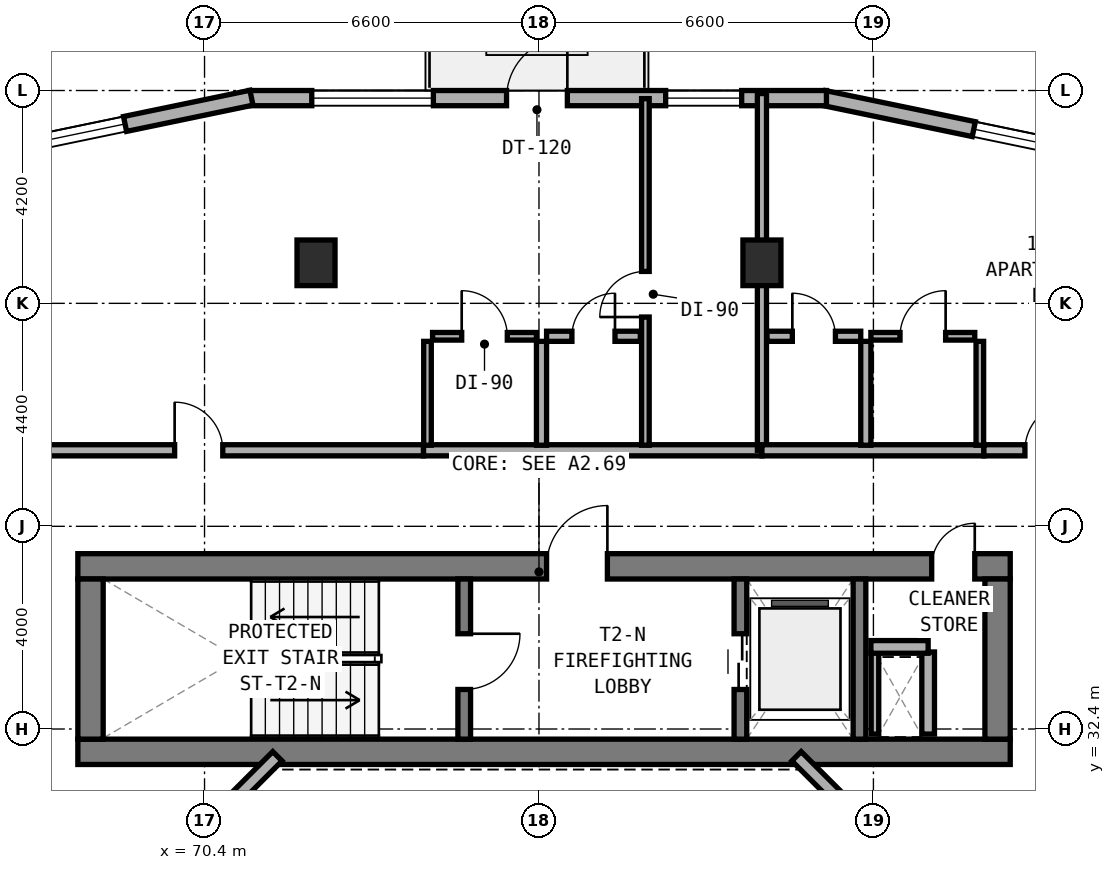
"""IFC4 building model, lengths in metres.
Left out: names, types, materials, properties, quantities, classifications, styles, units other than length and angle.
Written with IfcOpenShell. Run it as: python <this file> out.ifc"""

import sys

from ifc_helpers import new_model, si_unit, direction, frame, frame_2d, origin, origin_2d, place, context, subcontext, project, spatial, rectangle, extrude, element, fill, save


model = new_model("IFC4")
c1 = context("Model", 3, precision=1e-05, world=origin(), true_north=direction((0.0, 1.0)))
c2 = subcontext(c1, "Body", "Model", "MODEL_VIEW")
j1 = project(units=[si_unit("LENGTHUNIT", "METRE"), si_unit("PLANEANGLEUNIT", "RADIAN")], contexts=[c1])
p1 = place(None, origin())
s1 = spatial("IfcSite", under=j1, at=p1, CompositionType="ELEMENT")
p2 = place(p1, origin())
s2 = spatial("IfcBuilding", under=s1, at=p2, CompositionType="ELEMENT")
p3 = place(p2, frame((0.0, 0.0, 69.5)))
s3 = spatial("IfcBuildingStorey", under=s2, at=p3, CompositionType="ELEMENT", Elevation=69.5)
p4 = place(p3, frame((67.9, 31.95, 0.0), z_axis=(0.0, 0.0, 1.0), x_axis=(1.0, 0.0, 0.0)))
e1 = element("IfcWall", 1, at=p4, inside=s3, PredefinedType="SHEAR", context=c2, shape_type="SweptSolid", body=[
    extrude(rectangle(XDim=18.4, YDim=0.5, at=frame_2d((9.2, 0.0))), origin(), (0.0, 0.0, 1.0), 3.5),
])
p5 = place(p3, frame((67.9, 35.61, 0.0), z_axis=(0.0, 0.0, 1.0), x_axis=(1.0, 0.0, 0.0)))
e2 = element("IfcWall", 2, at=p5, inside=s3, PredefinedType="SHEAR", context=c2, shape_type="SweptSolid", body=[
    extrude(rectangle(XDim=18.4, YDim=0.5, at=frame_2d((9.2, 0.0))), origin(), (0.0, 0.0, 1.0), 3.5),
])
p6 = place(p5, frame((9.25, 0.0, 0.0)))
e3 = element("IfcOpeningElement", 3, at=p6, cuts=e2, PredefinedType="OPENING", context=c2, shape_type="SweptSolid", body=[
    extrude(rectangle(XDim=1.2, YDim=2.15, at=frame_2d((0.6, 1.075))), frame((0.0, 0.26, 0.0), z_axis=(0.0, -1.0, 0.0), x_axis=(1.0, 0.0, 0.0)), (0.0, 0.0, 1.0), 0.52),
])
p7 = place(p5, frame((16.85, 0.0, 0.0)))
e4 = element("IfcOpeningElement", 4, at=p7, cuts=e2, PredefinedType="OPENING", context=c2, shape_type="SweptSolid", body=[
    extrude(rectangle(XDim=0.85, YDim=2.1, at=frame_2d((0.425, 1.05))), frame((0.0, 0.26, 0.0), z_axis=(0.0, -1.0, 0.0), x_axis=(1.0, 0.0, 0.0)), (0.0, 0.0, 1.0), 0.52),
])
for number, where, z_axis, x_axis in (
    (5, (68.15, 32.2, 0.0), (0.0, 0.0, 1.0), (0.0, 1.0, 0.0)),
    (6, (86.05, 32.2, 0.0), (0.0, 0.0, 1.0), (0.0, 1.0, 0.0)),
):
    element("IfcWall", number, at=place(p3, frame(where, z_axis=z_axis, x_axis=x_axis)), inside=s3, PredefinedType="SHEAR", context=c2, shape_type="SweptSolid", body=[
        extrude(rectangle(XDim=3.16, YDim=0.5, at=frame_2d((1.58, 0.0))), origin(), (0.0, 0.0, 1.0), 3.5),
    ])
p8 = place(p3, frame((75.525, 32.2, 0.0), z_axis=(0.0, 0.0, 1.0), x_axis=(0.0, 1.0, 0.0)))
e7 = element("IfcWall", 7, at=p8, inside=s3, PredefinedType="STANDARD", context=c2, shape_type="SweptSolid", body=[
    extrude(rectangle(XDim=3.16, YDim=0.25, at=frame_2d((1.58, 0.0))), origin(), (0.0, 0.0, 1.0), 3.25),
])
p9 = place(p8, frame((0.98, 0.0, 0.0)))
e8 = element("IfcOpeningElement", 8, at=p9, cuts=e7, PredefinedType="OPENING", context=c2, shape_type="SweptSolid", body=[
    extrude(rectangle(XDim=1.1, YDim=2.15, at=frame_2d((0.55, 1.075))), frame((0.0, 0.135, 0.0), z_axis=(0.0, -1.0, 0.0), x_axis=(1.0, 0.0, 0.0)), (0.0, 0.0, 1.0), 0.27),
])
p10 = place(p3, frame((80.975, 32.2, 0.0), z_axis=(0.0, 0.0, 1.0), x_axis=(0.0, 1.0, 0.0)))
e9 = element("IfcWall", 9, at=p10, inside=s3, PredefinedType="STANDARD", context=c2, shape_type="SweptSolid", body=[
    extrude(rectangle(XDim=3.16, YDim=0.25, at=frame_2d((1.58, 0.0))), origin(), (0.0, 0.0, 1.0), 3.25),
])
p11 = place(p10, frame((0.98, 0.0, 0.0)))
e10 = element("IfcOpeningElement", 10, at=p11, cuts=e9, PredefinedType="OPENING", context=c2, shape_type="SweptSolid", body=[
    extrude(rectangle(XDim=1.1, YDim=2.15, at=frame_2d((0.55, 1.075))), frame((0.0, 0.135, 0.0), z_axis=(0.0, -1.0, 0.0), x_axis=(1.0, 0.0, 0.0)), (0.0, 0.0, 1.0), 0.27),
])
p12 = place(p3, frame((83.325, 32.2, 0.0), z_axis=(0.0, 0.0, 1.0), x_axis=(0.0, 1.0, 0.0)))
e11 = element("IfcWall", 11, at=p12, inside=s3, PredefinedType="STANDARD", context=c2, shape_type="SweptSolid", body=[
    extrude(rectangle(XDim=3.16, YDim=0.25, at=frame_2d((1.58, 0.0))), origin(), (0.0, 0.0, 1.0), 3.25),
])
for number, where, z_axis, x_axis in (
    (12, (72.6, 41.6, 0.0), (0.0, 0.0, 1.0), (1.0, 0.0, 0.0)),
    (13, (81.4, 41.6, 0.0), (0.0, 0.0, 1.0), (1.0, 0.0, 0.0)),
):
    element("IfcColumn", number, at=place(p3, frame(where, z_axis=z_axis, x_axis=x_axis)), inside=s3, PredefinedType="COLUMN", context=c2, shape_type="SweptSolid", body=[
        extrude(rectangle(XDim=0.75, YDim=0.9, at=origin_2d()), origin(), (0.0, 0.0, 1.0), 3.5),
    ])
p13 = place(p3, frame((91.298, 43.051, 0.0), z_axis=(0.0, 0.0, 1.0), x_axis=(-0.979120793441, 0.203279295189, 0.0)))
e14 = element("IfcWall", 14, at=p13, inside=s3, PredefinedType="STANDARD", context=c2, shape_type="SweptSolid", body=[
    extrude(rectangle(XDim=8.855, YDim=0.3, at=frame_2d((4.427, 0.0))), origin(), (0.0, 0.0, 1.0), 3.25),
])
p14 = place(p13, frame((3.439, 0.0, 0.8)))
e15 = element("IfcOpeningElement", 15, at=p14, cuts=e14, PredefinedType="OPENING", context=c2, shape_type="SweptSolid", body=[
    extrude(rectangle(XDim=2.4, YDim=1.6, at=frame_2d((1.2, 0.8))), frame((0.0, 0.16, 0.0), z_axis=(0.0, -1.0, 0.0), x_axis=(1.0, 0.0, 0.0)), (0.0, 0.0, 1.0), 0.32),
])
p15 = place(p3, frame((82.673, 44.85, 0.0), z_axis=(0.0, 0.0, 1.0), x_axis=(-1.0, 0.0, 0.0)))
e16 = element("IfcWall", 16, at=p15, inside=s3, PredefinedType="STANDARD", context=c2, shape_type="SweptSolid", body=[
    extrude(rectangle(XDim=11.391, YDim=0.3, at=frame_2d((5.696, 0.0))), origin(), (0.0, 0.0, 1.0), 3.25),
])
p16 = place(p15, frame((5.113, 0.0, 0.0)))
e17 = element("IfcOpeningElement", 17, at=p16, cuts=e16, PredefinedType="OPENING", context=c2, shape_type="SweptSolid", body=[
    extrude(rectangle(XDim=1.2, YDim=2.15, at=frame_2d((0.6, 1.075))), frame((0.0, 0.16, 0.0), z_axis=(0.0, -1.0, 0.0), x_axis=(1.0, 0.0, 0.0)), (0.0, 0.0, 1.0), 0.32),
])
p17 = place(p15, frame((1.673, 0.0, 0.85)))
e18 = element("IfcOpeningElement", 18, at=p17, cuts=e16, PredefinedType="OPENING", context=c2, shape_type="SweptSolid", body=[
    extrude(rectangle(XDim=1.5, YDim=1.5, at=frame_2d((0.75, 0.75))), frame((0.0, 0.16, 0.0), z_axis=(0.0, -1.0, 0.0), x_axis=(1.0, 0.0, 0.0)), (0.0, 0.0, 1.0), 0.32),
])
p18 = place(p15, frame((7.757, 0.0, 0.8)))
e19 = element("IfcOpeningElement", 19, at=p18, cuts=e16, PredefinedType="OPENING", context=c2, shape_type="SweptSolid", body=[
    extrude(rectangle(XDim=2.4, YDim=1.6, at=frame_2d((1.2, 0.8))), frame((0.0, 0.16, 0.0), z_axis=(0.0, -1.0, 0.0), x_axis=(1.0, 0.0, 0.0)), (0.0, 0.0, 1.0), 0.32),
])
p19 = place(p3, frame((71.326, 44.858, 0.0), z_axis=(0.0, 0.0, 1.0), x_axis=(-0.979124350489, -0.203262161453, 0.0)))
e20 = element("IfcWall", 20, at=p19, inside=s3, PredefinedType="STANDARD", context=c2, shape_type="SweptSolid", body=[
    extrude(rectangle(XDim=8.889, YDim=0.3, at=frame_2d((4.445, 0.0))), origin(), (0.0, 0.0, 1.0), 3.25),
])
p20 = place(p19, frame((2.548, 0.0, 0.8)))
e21 = element("IfcOpeningElement", 21, at=p20, cuts=e20, PredefinedType="OPENING", context=c2, shape_type="SweptSolid", body=[
    extrude(rectangle(XDim=2.4, YDim=1.6, at=frame_2d((1.2, 0.8))), frame((0.0, 0.16, 0.0), z_axis=(0.0, -1.0, 0.0), x_axis=(1.0, 0.0, 0.0)), (0.0, 0.0, 1.0), 0.32),
])
for number, where, z_axis, x_axis in (
    (22, (83.716, 30.228, 0.0), (0.0, 0.0, 1.0), (-0.707, 0.707, 0.0)),
    (23, (71.838, 31.862, 0.0), (0.0, 0.0, 1.0), (-0.707, -0.707, 0.0)),
):
    element("IfcWall", number, at=place(p3, frame(where, z_axis=z_axis, x_axis=x_axis)), inside=s3, PredefinedType="STANDARD", context=c2, shape_type="SweptSolid", body=[
        extrude(rectangle(XDim=2.311, YDim=0.26, at=frame_2d((1.155, 0.0))), origin(), (0.0, 0.0, 1.0), 3.25),
    ])
p21 = place(p3, frame((83.63, 32.3, 0.0), z_axis=(0.0, 0.0, 1.0), x_axis=(0.0, 1.0, 0.0)))
e24 = element("IfcWall", 24, at=p21, inside=s3, PredefinedType="PARTITIONING", context=c2, shape_type="SweptSolid", body=[
    extrude(rectangle(XDim=1.62, YDim=0.15, at=frame_2d((0.81, 0.0))), origin(), (0.0, 0.0, 1.0), 2.725),
])
p22 = place(p3, frame((84.68, 32.3, 0.0), z_axis=(0.0, 0.0, 1.0), x_axis=(0.0, 1.0, 0.0)))
e25 = element("IfcWall", 25, at=p22, inside=s3, PredefinedType="SOLIDWALL", context=c2, shape_type="SweptSolid", body=[
    extrude(rectangle(XDim=1.62, YDim=0.25, at=frame_2d((0.81, 0.0))), origin(), (0.0, 0.0, 1.0), 3.22),
])
p23 = place(p3, frame((83.55, 34.02, 0.0), z_axis=(0.0, 0.0, 1.0), x_axis=(1.0, 0.0, 0.0)))
e26 = element("IfcWall", 26, at=p23, inside=s3, PredefinedType="SOLIDWALL", context=c2, shape_type="SweptSolid", body=[
    extrude(rectangle(XDim=1.13, YDim=0.25, at=frame_2d((0.565, 0.0))), origin(), (0.0, 0.0, 1.0), 3.22),
])
p24 = place(p3, frame((74.72, 37.9, 0.0), z_axis=(0.0, 0.0, 1.0), x_axis=(1.0, 0.0, 0.0)))
e27 = element("IfcWall", 27, at=p24, inside=s3, PredefinedType="SOLIDWALL", context=c2, shape_type="SweptSolid", body=[
    extrude(rectangle(XDim=6.68, YDim=0.22, at=frame_2d((3.34, 0.0))), origin(), (0.0, 0.0, 1.0), 2.725),
])
p25 = place(p3, frame((65.85, 37.9, 0.0), z_axis=(0.0, 0.0, 1.0), x_axis=(1.0, 0.0, 0.0)))
e28 = element("IfcWall", 28, at=p25, inside=s3, PredefinedType="SOLIDWALL", context=c2, shape_type="SweptSolid", body=[
    extrude(rectangle(XDim=8.87, YDim=0.22, at=frame_2d((4.435, 0.0))), origin(), (0.0, 0.0, 1.0), 2.725),
])
p26 = place(p25, frame((3.96, 0.0, 0.0)))
e29 = element("IfcOpeningElement", 29, at=p26, cuts=e28, PredefinedType="OPENING", context=c2, shape_type="SweptSolid", body=[
    extrude(rectangle(XDim=0.95, YDim=2.1, at=frame_2d((0.475, 1.05))), frame((0.0, 0.12, 0.0), z_axis=(0.0, -1.0, 0.0), x_axis=(1.0, 0.0, 0.0)), (0.0, 0.0, 1.0), 0.24),
])
p27 = place(p3, frame((79.1, 38.0, 0.0), z_axis=(0.0, 0.0, 1.0), x_axis=(0.0, 1.0, 0.0)))
e30 = element("IfcWall", 30, at=p27, inside=s3, PredefinedType="PARTITIONING", context=c2, shape_type="SweptSolid", body=[
    extrude(rectangle(XDim=6.84, YDim=0.15, at=frame_2d((3.42, 0.0))), origin(), (0.0, 0.0, 1.0), 2.865),
])
p28 = place(p27, frame((2.53, 0.0, 0.0)))
e31 = element("IfcOpeningElement", 31, at=p28, cuts=e30, PredefinedType="OPENING", context=c2, shape_type="SweptSolid", body=[
    extrude(rectangle(XDim=0.9, YDim=2.1, at=frame_2d((0.45, 1.05))), frame((0.0, 0.085, 0.0), z_axis=(0.0, -1.0, 0.0), x_axis=(1.0, 0.0, 0.0)), (0.0, 0.0, 1.0), 0.17),
])
p29 = place(p3, frame((77.05, 38.0, 0.0), z_axis=(0.0, 0.0, 1.0), x_axis=(0.0, 1.0, 0.0)))
e32 = element("IfcWall", 32, at=p29, inside=s3, PredefinedType="PLUMBINGWALL", context=c2, shape_type="SweptSolid", body=[
    extrude(rectangle(XDim=2.05, YDim=0.2, at=frame_2d((1.025, 0.0))), origin(), (0.0, 0.0, 1.0), 2.955),
])
p30 = place(p3, frame((74.8, 38.0, 0.0), z_axis=(0.0, 0.0, 1.0), x_axis=(0.0, 1.0, 0.0)))
e33 = element("IfcWall", 33, at=p30, inside=s3, PredefinedType="PARTITIONING", context=c2, shape_type="SweptSolid", body=[
    extrude(rectangle(XDim=2.05, YDim=0.15, at=frame_2d((1.025, 0.0))), origin(), (0.0, 0.0, 1.0), 2.955),
])
p31 = place(p3, frame((77.15, 40.15, 0.0), z_axis=(0.0, 0.0, 1.0), x_axis=(1.0, 0.0, 0.0)))
e34 = element("IfcWall", 34, at=p31, inside=s3, PredefinedType="PLUMBINGWALL", context=c2, shape_type="SweptSolid", body=[
    extrude(rectangle(XDim=1.85, YDim=0.2, at=frame_2d((0.925, 0.0))), origin(), (0.0, 0.0, 1.0), 3.22),
])
p32 = place(p31, frame((0.5, 0.0, 0.0)))
e35 = element("IfcOpeningElement", 35, at=p32, cuts=e34, PredefinedType="OPENING", context=c2, shape_type="SweptSolid", body=[
    extrude(rectangle(XDim=0.85, YDim=2.1, at=frame_2d((0.425, 1.05))), frame((0.0, 0.11, 0.0), z_axis=(0.0, -1.0, 0.0), x_axis=(1.0, 0.0, 0.0)), (0.0, 0.0, 1.0), 0.22),
])
p33 = place(p3, frame((74.9, 40.15, 0.0), z_axis=(0.0, 0.0, 1.0), x_axis=(1.0, 0.0, 0.0)))
e36 = element("IfcWall", 36, at=p33, inside=s3, PredefinedType="PARTITIONING", context=c2, shape_type="SweptSolid", body=[
    extrude(rectangle(XDim=2.05, YDim=0.15, at=frame_2d((1.025, 0.0))), origin(), (0.0, 0.0, 1.0), 3.22),
])
p34 = place(p33, frame((0.575, 0.0, 0.0)))
e37 = element("IfcOpeningElement", 37, at=p34, cuts=e36, PredefinedType="OPENING", context=c2, shape_type="SweptSolid", body=[
    extrude(rectangle(XDim=0.9, YDim=2.1, at=frame_2d((0.45, 1.05))), frame((0.0, 0.085, 0.0), z_axis=(0.0, -1.0, 0.0), x_axis=(1.0, 0.0, 0.0)), (0.0, 0.0, 1.0), 0.17),
])
p35 = place(p3, frame((81.4, 37.9, 0.0), z_axis=(0.0, 0.0, 1.0), x_axis=(0.0, 1.0, 0.0)))
e38 = element("IfcWall", 38, at=p35, inside=s3, PredefinedType="SOLIDWALL", context=c2, shape_type="SweptSolid", body=[
    extrude(rectangle(XDim=7.04, YDim=0.18, at=frame_2d((3.52, 0.0))), origin(), (0.0, 0.0, 1.0), 2.725),
])
p36 = place(p3, frame((81.4, 37.9, 0.0), z_axis=(0.0, 0.0, 1.0), x_axis=(1.0, 0.0, 0.0)))
e39 = element("IfcWall", 39, at=p36, inside=s3, PredefinedType="SOLIDWALL", context=c2, shape_type="SweptSolid", body=[
    extrude(rectangle(XDim=4.38, YDim=0.22, at=frame_2d((2.19, 0.0))), origin(), (0.0, 0.0, 1.0), 2.725),
])
p37 = place(p3, frame((85.78, 37.9, 0.0), z_axis=(0.0, 0.0, 1.0), x_axis=(1.0, 0.0, 0.0)))
e40 = element("IfcWall", 40, at=p37, inside=s3, PredefinedType="SOLIDWALL", context=c2, shape_type="SweptSolid", body=[
    extrude(rectangle(XDim=2.57, YDim=0.22, at=frame_2d((1.285, 0.0))), origin(), (0.0, 0.0, 1.0), 3.22),
])
p38 = place(p37, frame((0.81, 0.0, 0.0)))
e41 = element("IfcOpeningElement", 41, at=p38, cuts=e40, PredefinedType="OPENING", context=c2, shape_type="SweptSolid", body=[
    extrude(rectangle(XDim=0.95, YDim=2.1, at=frame_2d((0.475, 1.05))), frame((0.0, 0.12, 0.0), z_axis=(0.0, -1.0, 0.0), x_axis=(1.0, 0.0, 0.0)), (0.0, 0.0, 1.0), 0.24),
])
p39 = place(p3, frame((83.45, 38.0, 0.0), z_axis=(0.0, 0.0, 1.0), x_axis=(0.0, 1.0, 0.0)))
e42 = element("IfcWall", 42, at=p39, inside=s3, PredefinedType="PLUMBINGWALL", context=c2, shape_type="SweptSolid", body=[
    extrude(rectangle(XDim=2.05, YDim=0.2, at=frame_2d((1.025, 0.0))), origin(), (0.0, 0.0, 1.0), 3.22),
])
p40 = place(p3, frame((85.7, 38.0, 0.0), z_axis=(0.0, 0.0, 1.0), x_axis=(0.0, 1.0, 0.0)))
e43 = element("IfcWall", 43, at=p40, inside=s3, PredefinedType="PARTITIONING", context=c2, shape_type="SweptSolid", body=[
    extrude(rectangle(XDim=2.05, YDim=0.15, at=frame_2d((1.025, 0.0))), origin(), (0.0, 0.0, 1.0), 3.22),
])
p41 = place(p3, frame((81.5, 40.15, 0.0), z_axis=(0.0, 0.0, 1.0), x_axis=(1.0, 0.0, 0.0)))
e44 = element("IfcWall", 44, at=p41, inside=s3, PredefinedType="PLUMBINGWALL", context=c2, shape_type="SweptSolid", body=[
    extrude(rectangle(XDim=1.85, YDim=0.2, at=frame_2d((0.925, 0.0))), origin(), (0.0, 0.0, 1.0), 2.725),
])
p42 = place(p41, frame((0.5, 0.0, 0.0)))
e45 = element("IfcOpeningElement", 45, at=p42, cuts=e44, PredefinedType="OPENING", context=c2, shape_type="SweptSolid", body=[
    extrude(rectangle(XDim=0.85, YDim=2.1, at=frame_2d((0.425, 1.05))), frame((0.0, 0.11, 0.0), z_axis=(0.0, -1.0, 0.0), x_axis=(1.0, 0.0, 0.0)), (0.0, 0.0, 1.0), 0.22),
])
p43 = place(p3, frame((83.55, 40.15, 0.0), z_axis=(0.0, 0.0, 1.0), x_axis=(1.0, 0.0, 0.0)))
e46 = element("IfcWall", 46, at=p43, inside=s3, PredefinedType="PARTITIONING", context=c2, shape_type="SweptSolid", body=[
    extrude(rectangle(XDim=2.05, YDim=0.15, at=frame_2d((1.025, 0.0))), origin(), (0.0, 0.0, 1.0), 3.22),
])
p44 = place(p43, frame((0.575, 0.0, 0.0)))
e47 = element("IfcOpeningElement", 47, at=p44, cuts=e46, PredefinedType="OPENING", context=c2, shape_type="SweptSolid", body=[
    extrude(rectangle(XDim=0.9, YDim=2.1, at=frame_2d((0.45, 1.05))), frame((0.0, 0.085, 0.0), z_axis=(0.0, -1.0, 0.0), x_axis=(1.0, 0.0, 0.0)), (0.0, 0.0, 1.0), 0.17),
])
p45 = place(p14, origin())
e48 = element("IfcWindow", 48, at=p45, inside=s3, PartitioningType="SINGLE_PANEL", PredefinedType="WINDOW", context=c2, shape_type="SweptSolid", body=[
    extrude(rectangle(XDim=2.4, YDim=1.6, at=frame_2d((1.2, 0.8))), frame((0.0, 0.03, 0.0), z_axis=(0.0, -1.0, 0.0), x_axis=(1.0, 0.0, 0.0)), (0.0, 0.0, 1.0), 0.06),
])
fill(e15, e48)
p46 = place(p16, frame((1.2, 0.0, 0.0), z_axis=(0.0, 0.0, 1.0), x_axis=(-1.0, 0.0, 0.0)))
e49 = element("IfcDoor", 49, at=p46, inside=s3, OperationType="SINGLE_SWING_RIGHT", PredefinedType="DOOR", context=c2, shape_type="SweptSolid", body=[
    extrude(rectangle(XDim=1.2, YDim=2.15, at=frame_2d((0.6, 1.075))), frame((0.0, 0.025, 0.0), z_axis=(0.0, -1.0, 0.0), x_axis=(1.0, 0.0, 0.0)), (0.0, 0.0, 1.0), 0.05),
])
fill(e17, e49)
p47 = place(p17, origin())
e50 = element("IfcWindow", 50, at=p47, inside=s3, PartitioningType="SINGLE_PANEL", PredefinedType="WINDOW", context=c2, shape_type="SweptSolid", body=[
    extrude(rectangle(XDim=1.5, YDim=1.5, at=frame_2d((0.75, 0.75))), frame((0.0, 0.03, 0.0), z_axis=(0.0, -1.0, 0.0), x_axis=(1.0, 0.0, 0.0)), (0.0, 0.0, 1.0), 0.06),
])
fill(e18, e50)
p48 = place(p18, origin())
e51 = element("IfcWindow", 51, at=p48, inside=s3, PartitioningType="SINGLE_PANEL", PredefinedType="WINDOW", context=c2, shape_type="SweptSolid", body=[
    extrude(rectangle(XDim=2.4, YDim=1.6, at=frame_2d((1.2, 0.8))), frame((0.0, 0.03, 0.0), z_axis=(0.0, -1.0, 0.0), x_axis=(1.0, 0.0, 0.0)), (0.0, 0.0, 1.0), 0.06),
])
fill(e19, e51)
p49 = place(p20, origin())
e52 = element("IfcWindow", 52, at=p49, inside=s3, PartitioningType="SINGLE_PANEL", PredefinedType="WINDOW", context=c2, shape_type="SweptSolid", body=[
    extrude(rectangle(XDim=2.4, YDim=1.6, at=frame_2d((1.2, 0.8))), frame((0.0, 0.03, 0.0), z_axis=(0.0, -1.0, 0.0), x_axis=(1.0, 0.0, 0.0)), (0.0, 0.0, 1.0), 0.06),
])
fill(e21, e52)
p50 = place(p9, frame((1.1, 0.0, 0.0), z_axis=(0.0, 0.0, 1.0), x_axis=(-1.0, 0.0, 0.0)))
e53 = element("IfcDoor", 53, at=p50, inside=s3, OperationType="SINGLE_SWING_LEFT", PredefinedType="DOOR", context=c2, shape_type="SweptSolid", body=[
    extrude(rectangle(XDim=1.1, YDim=2.15, at=frame_2d((0.55, 1.075))), frame((0.0, 0.025, 0.0), z_axis=(0.0, -1.0, 0.0), x_axis=(1.0, 0.0, 0.0)), (0.0, 0.0, 1.0), 0.05),
])
fill(e8, e53)
p51 = place(p6, origin())
e54 = element("IfcDoor", 54, at=p51, inside=s3, OperationType="SINGLE_SWING_RIGHT", PredefinedType="DOOR", context=c2, shape_type="SweptSolid", body=[
    extrude(rectangle(XDim=1.2, YDim=2.15, at=frame_2d((0.6, 1.075))), frame((0.0, 0.025, 0.0), z_axis=(0.0, -1.0, 0.0), x_axis=(1.0, 0.0, 0.0)), (0.0, 0.0, 1.0), 0.05),
])
fill(e3, e54)
p52 = place(p11, origin())
e55 = element("IfcDoor", 55, at=p52, inside=s3, OperationType="DOUBLE_DOOR_SLIDING", PredefinedType="DOOR", context=c2, shape_type="SweptSolid", body=[
    extrude(rectangle(XDim=1.1, YDim=2.15, at=frame_2d((0.55, 1.075))), frame((0.0, 0.025, 0.0), z_axis=(0.0, -1.0, 0.0), x_axis=(1.0, 0.0, 0.0)), (0.0, 0.0, 1.0), 0.05),
])
fill(e10, e55)
p53 = place(p7, origin())
e56 = element("IfcDoor", 56, at=p53, inside=s3, OperationType="SINGLE_SWING_RIGHT", PredefinedType="DOOR", context=c2, shape_type="SweptSolid", body=[
    extrude(rectangle(XDim=0.85, YDim=2.1, at=frame_2d((0.425, 1.05))), frame((0.0, 0.025, 0.0), z_axis=(0.0, -1.0, 0.0), x_axis=(1.0, 0.0, 0.0)), (0.0, 0.0, 1.0), 0.05),
])
fill(e4, e56)
p54 = place(p26, origin())
e57 = element("IfcDoor", 57, at=p54, inside=s3, OperationType="SINGLE_SWING_LEFT", PredefinedType="DOOR", context=c2, shape_type="SweptSolid", body=[
    extrude(rectangle(XDim=0.95, YDim=2.1, at=frame_2d((0.475, 1.05))), frame((0.0, 0.025, 0.0), z_axis=(0.0, -1.0, 0.0), x_axis=(1.0, 0.0, 0.0)), (0.0, 0.0, 1.0), 0.05),
])
fill(e29, e57)
p55 = place(p28, origin())
e58 = element("IfcDoor", 58, at=p55, inside=s3, OperationType="SINGLE_SWING_LEFT", PredefinedType="DOOR", context=c2, shape_type="SweptSolid", body=[
    extrude(rectangle(XDim=0.9, YDim=2.1, at=frame_2d((0.45, 1.05))), frame((0.0, 0.025, 0.0), z_axis=(0.0, -1.0, 0.0), x_axis=(1.0, 0.0, 0.0)), (0.0, 0.0, 1.0), 0.05),
])
fill(e31, e58)
p56 = place(p32, origin())
e59 = element("IfcDoor", 59, at=p56, inside=s3, OperationType="SINGLE_SWING_RIGHT", PredefinedType="DOOR", context=c2, shape_type="SweptSolid", body=[
    extrude(rectangle(XDim=0.85, YDim=2.1, at=frame_2d((0.425, 1.05))), frame((0.0, 0.025, 0.0), z_axis=(0.0, -1.0, 0.0), x_axis=(1.0, 0.0, 0.0)), (0.0, 0.0, 1.0), 0.05),
])
fill(e35, e59)
p57 = place(p34, origin())
e60 = element("IfcDoor", 60, at=p57, inside=s3, OperationType="SINGLE_SWING_LEFT", PredefinedType="DOOR", context=c2, shape_type="SweptSolid", body=[
    extrude(rectangle(XDim=0.9, YDim=2.1, at=frame_2d((0.45, 1.05))), frame((0.0, 0.025, 0.0), z_axis=(0.0, -1.0, 0.0), x_axis=(1.0, 0.0, 0.0)), (0.0, 0.0, 1.0), 0.05),
])
fill(e37, e60)
p58 = place(p38, origin())
e61 = element("IfcDoor", 61, at=p58, inside=s3, OperationType="SINGLE_SWING_RIGHT", PredefinedType="DOOR", context=c2, shape_type="SweptSolid", body=[
    extrude(rectangle(XDim=0.95, YDim=2.1, at=frame_2d((0.475, 1.05))), frame((0.0, 0.025, 0.0), z_axis=(0.0, -1.0, 0.0), x_axis=(1.0, 0.0, 0.0)), (0.0, 0.0, 1.0), 0.05),
])
fill(e41, e61)
p59 = place(p42, origin())
e62 = element("IfcDoor", 62, at=p59, inside=s3, OperationType="SINGLE_SWING_LEFT", PredefinedType="DOOR", context=c2, shape_type="SweptSolid", body=[
    extrude(rectangle(XDim=0.85, YDim=2.1, at=frame_2d((0.425, 1.05))), frame((0.0, 0.025, 0.0), z_axis=(0.0, -1.0, 0.0), x_axis=(1.0, 0.0, 0.0)), (0.0, 0.0, 1.0), 0.05),
])
fill(e45, e62)
p60 = place(p44, origin())
e63 = element("IfcDoor", 63, at=p60, inside=s3, OperationType="SINGLE_SWING_RIGHT", PredefinedType="DOOR", context=c2, shape_type="SweptSolid", body=[
    extrude(rectangle(XDim=0.9, YDim=2.1, at=frame_2d((0.45, 1.05))), frame((0.0, 0.025, 0.0), z_axis=(0.0, -1.0, 0.0), x_axis=(1.0, 0.0, 0.0)), (0.0, 0.0, 1.0), 0.05),
])
fill(e47, e63)
save(model, sys.argv[1])
